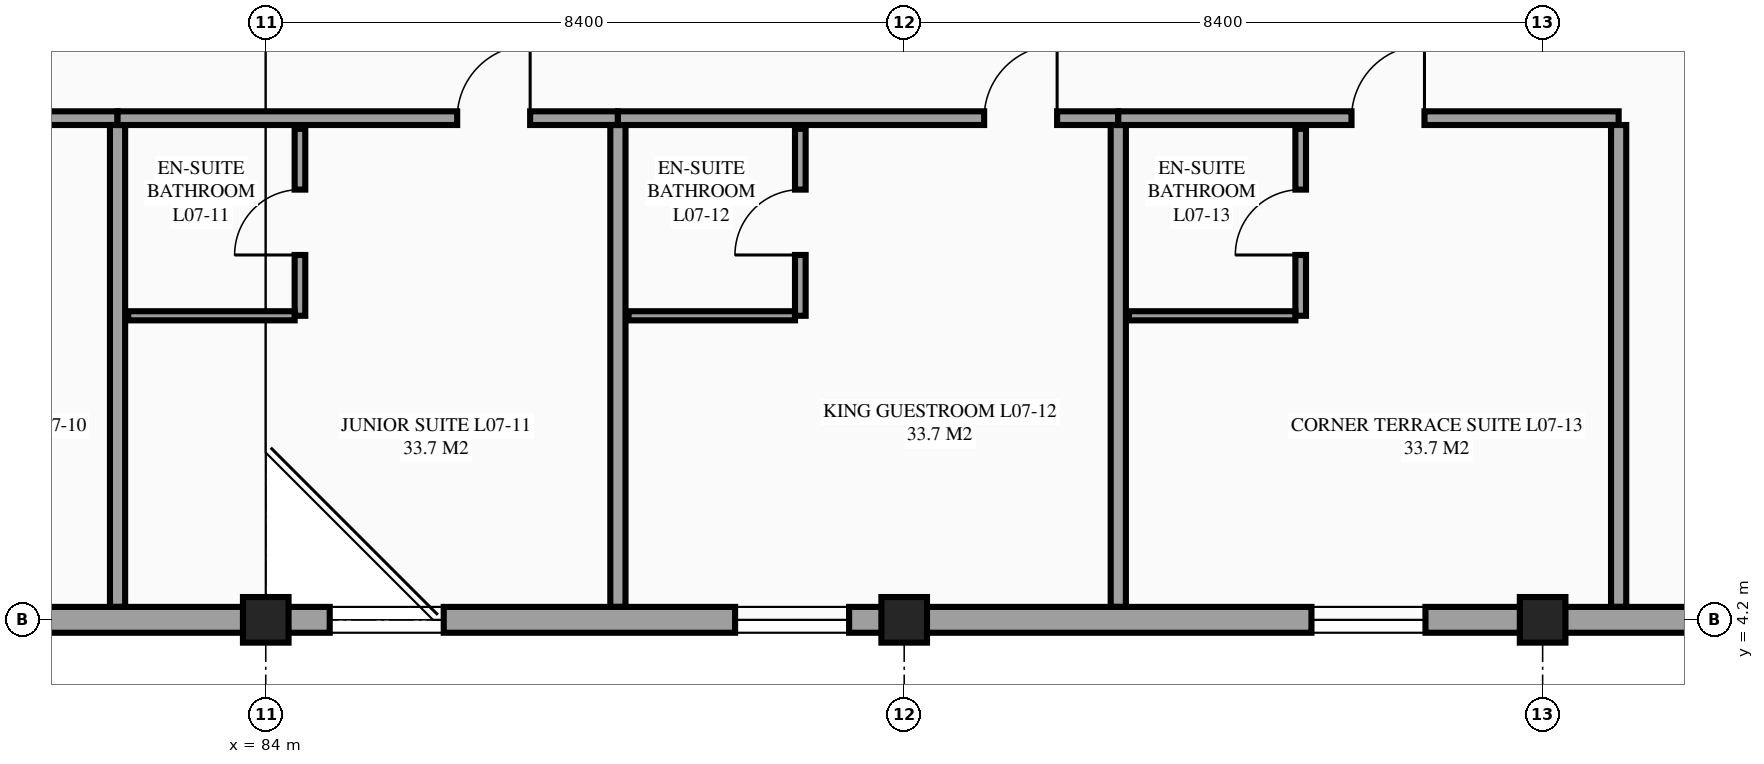
"""IFC4 building model, lengths in metres.
Left out: names, types, materials, properties, quantities, classifications, styles, units other than length and angle.
Written with IfcOpenShell. Run it as: python <this file> out.ifc"""

import sys

from ifc_helpers import new_model, si_unit, direction, frame, frame_2d, origin, origin_2d, place, context, subcontext, project, spatial, rectangle, extrude, element, fill, save


model = new_model("IFC4")
c1 = context("Model", 3, precision=1e-05, world=origin(), true_north=direction((0.0, 1.0)))
c2 = subcontext(c1, "Body", "Model", "MODEL_VIEW")
j1 = project(units=[si_unit("LENGTHUNIT", "METRE"), si_unit("PLANEANGLEUNIT", "RADIAN")], contexts=[c1])
p1 = place(None, origin())
s1 = spatial("IfcSite", under=j1, at=p1, CompositionType="ELEMENT")
p2 = place(p1, origin())
s2 = spatial("IfcBuilding", under=s1, at=p2, CompositionType="ELEMENT")
p3 = place(p2, frame((0.0, 0.0, 29.1)))
s3 = spatial("IfcBuildingStorey", under=s2, at=p3, CompositionType="ELEMENT", Elevation=29.1)
for number, where, z_axis, x_axis in (
    (1, (84.0, 4.2, 0.0), (0.0, 0.0, 1.0), (1.0, 0.0, 0.0)),
    (2, (92.4, 4.2, 0.0), (0.0, 0.0, 1.0), (1.0, 0.0, 0.0)),
    (3, (100.8, 4.2, 0.0), (0.0, 0.0, 1.0), (1.0, 0.0, 0.0)),
):
    element("IfcColumn", number, at=place(p3, frame(where, z_axis=z_axis, x_axis=x_axis)), inside=s3, PredefinedType="COLUMN", context=c2, shape_type="SweptSolid", body=[
        extrude(rectangle(XDim=0.6, YDim=0.6, at=origin_2d()), origin(), (0.0, 0.0, 1.0), 3.6),
    ])
p4 = place(p3, frame((75.467, 10.8, 0.0), z_axis=(0.0, 0.0, 1.0), x_axis=(1.0, 0.0, 0.0)))
e4 = element("IfcWall", 4, at=p4, inside=s3, PredefinedType="PARTITIONING", context=c2, shape_type="SweptSolid", body=[
    extrude(rectangle(XDim=6.583, YDim=0.18, at=frame_2d((3.292, 0.0))), origin(), (0.0, 0.0, 1.0), 3.375),
])
p5 = place(p4, frame((4.469, 0.0, 0.0)))
e5 = element("IfcOpeningElement", 5, at=p5, cuts=e4, PredefinedType="OPENING", context=c2, shape_type="SweptSolid", body=[
    extrude(rectangle(XDim=0.96, YDim=2.15, at=frame_2d((0.48, 1.075))), frame((0.0, 0.1, 0.0), z_axis=(0.0, -1.0, 0.0), x_axis=(1.0, 0.0, 0.0)), (0.0, 0.0, 1.0), 0.2),
])
p6 = place(p3, frame((82.05, 4.37, 0.0), z_axis=(0.0, 0.0, 1.0), x_axis=(0.0, 1.0, 0.0)))
e6 = element("IfcWall", 6, at=p6, inside=s3, PredefinedType="PARTITIONING", context=c2, shape_type="SweptSolid", body=[
    extrude(rectangle(XDim=6.34, YDim=0.2, at=frame_2d((3.17, 0.0))), origin(), (0.0, 0.0, 1.0), 3.375),
])
p7 = place(p3, frame((82.05, 10.8, 0.0), z_axis=(0.0, 0.0, 1.0), x_axis=(1.0, 0.0, 0.0)))
e7 = element("IfcWall", 7, at=p7, inside=s3, PredefinedType="PARTITIONING", context=c2, shape_type="SweptSolid", body=[
    extrude(rectangle(XDim=6.583, YDim=0.18, at=frame_2d((3.292, 0.0))), origin(), (0.0, 0.0, 1.0), 3.375),
])
p8 = place(p7, frame((4.469, 0.0, 0.0)))
e8 = element("IfcOpeningElement", 8, at=p8, cuts=e7, PredefinedType="OPENING", context=c2, shape_type="SweptSolid", body=[
    extrude(rectangle(XDim=0.96, YDim=2.15, at=frame_2d((0.48, 1.075))), frame((0.0, 0.1, 0.0), z_axis=(0.0, -1.0, 0.0), x_axis=(1.0, 0.0, 0.0)), (0.0, 0.0, 1.0), 0.2),
])
p9 = place(p3, frame((88.633, 4.37, 0.0), z_axis=(0.0, 0.0, 1.0), x_axis=(0.0, 1.0, 0.0)))
e9 = element("IfcWall", 9, at=p9, inside=s3, PredefinedType="PARTITIONING", context=c2, shape_type="SweptSolid", body=[
    extrude(rectangle(XDim=6.34, YDim=0.2, at=frame_2d((3.17, 0.0))), origin(), (0.0, 0.0, 1.0), 3.375),
])
p10 = place(p3, frame((84.45, 8.2, 0.0), z_axis=(0.0, 0.0, 1.0), x_axis=(0.0, 1.0, 0.0)))
e10 = element("IfcWall", 10, at=p10, inside=s3, PredefinedType="PARTITIONING", context=c2, shape_type="SweptSolid", body=[
    extrude(rectangle(XDim=2.46, YDim=0.14, at=frame_2d((1.23, 0.0))), origin(), (0.0, 0.0, 1.0), 3.375),
])
p11 = place(p10, frame((0.8, 0.0, 0.0)))
e11 = element("IfcOpeningElement", 11, at=p11, cuts=e10, PredefinedType="OPENING", context=c2, shape_type="SweptSolid", body=[
    extrude(rectangle(XDim=0.86, YDim=2.1, at=frame_2d((0.43, 1.05))), frame((0.0, 0.08, 0.0), z_axis=(0.0, -1.0, 0.0), x_axis=(1.0, 0.0, 0.0)), (0.0, 0.0, 1.0), 0.16),
])
p12 = place(p3, frame((82.19, 8.2, 0.0), z_axis=(0.0, 0.0, 1.0), x_axis=(1.0, 0.0, 0.0)))
e12 = element("IfcWall", 12, at=p12, inside=s3, PredefinedType="PARTITIONING", context=c2, shape_type="SweptSolid", body=[
    extrude(rectangle(XDim=2.19, YDim=0.12, at=frame_2d((1.095, 0.0))), origin(), (0.0, 0.0, 1.0), 3.375),
])
p13 = place(p3, frame((88.633, 10.8, 0.0), z_axis=(0.0, 0.0, 1.0), x_axis=(1.0, 0.0, 0.0)))
e13 = element("IfcWall", 13, at=p13, inside=s3, PredefinedType="PARTITIONING", context=c2, shape_type="SweptSolid", body=[
    extrude(rectangle(XDim=6.583, YDim=0.18, at=frame_2d((3.292, 0.0))), origin(), (0.0, 0.0, 1.0), 3.375),
])
p14 = place(p13, frame((4.819, 0.0, 0.0)))
e14 = element("IfcOpeningElement", 14, at=p14, cuts=e13, PredefinedType="OPENING", context=c2, shape_type="SweptSolid", body=[
    extrude(rectangle(XDim=0.96, YDim=2.15, at=frame_2d((0.48, 1.075))), frame((0.0, 0.1, 0.0), z_axis=(0.0, -1.0, 0.0), x_axis=(1.0, 0.0, 0.0)), (0.0, 0.0, 1.0), 0.2),
])
p15 = place(p3, frame((95.217, 4.37, 0.0), z_axis=(0.0, 0.0, 1.0), x_axis=(0.0, 1.0, 0.0)))
e15 = element("IfcWall", 15, at=p15, inside=s3, PredefinedType="PARTITIONING", context=c2, shape_type="SweptSolid", body=[
    extrude(rectangle(XDim=6.34, YDim=0.2, at=frame_2d((3.17, 0.0))), origin(), (0.0, 0.0, 1.0), 3.375),
])
p16 = place(p3, frame((91.033, 8.2, 0.0), z_axis=(0.0, 0.0, 1.0), x_axis=(0.0, 1.0, 0.0)))
e16 = element("IfcWall", 16, at=p16, inside=s3, PredefinedType="PARTITIONING", context=c2, shape_type="SweptSolid", body=[
    extrude(rectangle(XDim=2.46, YDim=0.14, at=frame_2d((1.23, 0.0))), origin(), (0.0, 0.0, 1.0), 3.375),
])
p17 = place(p16, frame((0.8, 0.0, 0.0)))
e17 = element("IfcOpeningElement", 17, at=p17, cuts=e16, PredefinedType="OPENING", context=c2, shape_type="SweptSolid", body=[
    extrude(rectangle(XDim=0.86, YDim=2.1, at=frame_2d((0.43, 1.05))), frame((0.0, 0.08, 0.0), z_axis=(0.0, -1.0, 0.0), x_axis=(1.0, 0.0, 0.0)), (0.0, 0.0, 1.0), 0.16),
])
p18 = place(p3, frame((88.773, 8.2, 0.0), z_axis=(0.0, 0.0, 1.0), x_axis=(1.0, 0.0, 0.0)))
e18 = element("IfcWall", 18, at=p18, inside=s3, PredefinedType="PARTITIONING", context=c2, shape_type="SweptSolid", body=[
    extrude(rectangle(XDim=2.19, YDim=0.12, at=frame_2d((1.095, 0.0))), origin(), (0.0, 0.0, 1.0), 3.375),
])
p19 = place(p3, frame((95.217, 10.8, 0.0), z_axis=(0.0, 0.0, 1.0), x_axis=(1.0, 0.0, 0.0)))
e19 = element("IfcWall", 19, at=p19, inside=s3, PredefinedType="PARTITIONING", context=c2, shape_type="SweptSolid", body=[
    extrude(rectangle(XDim=6.583, YDim=0.18, at=frame_2d((3.292, 0.0))), origin(), (0.0, 0.0, 1.0), 3.375),
])
p20 = place(p19, frame((3.069, 0.0, 0.0)))
e20 = element("IfcOpeningElement", 20, at=p20, cuts=e19, PredefinedType="OPENING", context=c2, shape_type="SweptSolid", body=[
    extrude(rectangle(XDim=0.96, YDim=2.15, at=frame_2d((0.48, 1.075))), frame((0.0, 0.1, 0.0), z_axis=(0.0, -1.0, 0.0), x_axis=(1.0, 0.0, 0.0)), (0.0, 0.0, 1.0), 0.2),
])
p21 = place(p3, frame((101.8, 4.37, 0.0), z_axis=(0.0, 0.0, 1.0), x_axis=(0.0, 1.0, 0.0)))
e21 = element("IfcWall", 21, at=p21, inside=s3, PredefinedType="PARTITIONING", context=c2, shape_type="SweptSolid", body=[
    extrude(rectangle(XDim=6.34, YDim=0.2, at=frame_2d((3.17, 0.0))), origin(), (0.0, 0.0, 1.0), 3.375),
])
p22 = place(p3, frame((97.617, 8.2, 0.0), z_axis=(0.0, 0.0, 1.0), x_axis=(0.0, 1.0, 0.0)))
e22 = element("IfcWall", 22, at=p22, inside=s3, PredefinedType="PARTITIONING", context=c2, shape_type="SweptSolid", body=[
    extrude(rectangle(XDim=2.46, YDim=0.14, at=frame_2d((1.23, 0.0))), origin(), (0.0, 0.0, 1.0), 3.375),
])
p23 = place(p22, frame((0.8, 0.0, 0.0)))
e23 = element("IfcOpeningElement", 23, at=p23, cuts=e22, PredefinedType="OPENING", context=c2, shape_type="SweptSolid", body=[
    extrude(rectangle(XDim=0.86, YDim=2.1, at=frame_2d((0.43, 1.05))), frame((0.0, 0.08, 0.0), z_axis=(0.0, -1.0, 0.0), x_axis=(1.0, 0.0, 0.0)), (0.0, 0.0, 1.0), 0.16),
])
p24 = place(p3, frame((95.357, 8.2, 0.0), z_axis=(0.0, 0.0, 1.0), x_axis=(1.0, 0.0, 0.0)))
e24 = element("IfcWall", 24, at=p24, inside=s3, PredefinedType="PARTITIONING", context=c2, shape_type="SweptSolid", body=[
    extrude(rectangle(XDim=2.19, YDim=0.12, at=frame_2d((1.095, 0.0))), origin(), (0.0, 0.0, 1.0), 3.375),
])
p25 = place(p3, frame((75.6, 4.2, 0.0), z_axis=(0.0, 0.0, 1.0), x_axis=(1.0, 0.0, 0.0)))
e25 = element("IfcWall", 25, at=p25, inside=s3, PredefinedType="STANDARD", context=c2, shape_type="SweptSolid", body=[
    extrude(rectangle(XDim=8.4, YDim=0.34, at=frame_2d((4.2, 0.0))), origin(), (0.0, 0.0, 1.0), 2.78),
])
p26 = place(p25, frame((2.408, 0.0, 0.85)))
e26 = element("IfcOpeningElement", 26, at=p26, cuts=e25, PredefinedType="OPENING", context=c2, shape_type="SweptSolid", body=[
    extrude(rectangle(XDim=1.5, YDim=1.5, at=frame_2d((0.75, 0.75))), frame((0.0, 0.18, 0.0), z_axis=(0.0, -1.0, 0.0), x_axis=(1.0, 0.0, 0.0)), (0.0, 0.0, 1.0), 0.36),
])
p27 = place(p3, frame((84.0, 4.2, 0.0), z_axis=(0.0, 0.0, 1.0), x_axis=(1.0, 0.0, 0.0)))
e27 = element("IfcWall", 27, at=p27, inside=s3, PredefinedType="STANDARD", context=c2, shape_type="SweptSolid", body=[
    extrude(rectangle(XDim=8.4, YDim=0.34, at=frame_2d((4.2, 0.0))), origin(), (0.0, 0.0, 1.0), 2.43),
])
p28 = place(p27, frame((0.842, 0.0, 0.85)))
e28 = element("IfcOpeningElement", 28, at=p28, cuts=e27, PredefinedType="OPENING", context=c2, shape_type="SweptSolid", body=[
    extrude(rectangle(XDim=1.5, YDim=1.5, at=frame_2d((0.75, 0.75))), frame((0.0, 0.18, 0.0), z_axis=(0.0, -1.0, 0.0), x_axis=(1.0, 0.0, 0.0)), (0.0, 0.0, 1.0), 0.36),
])
p29 = place(p27, frame((6.175, 0.0, 0.85)))
e29 = element("IfcOpeningElement", 29, at=p29, cuts=e27, PredefinedType="OPENING", context=c2, shape_type="SweptSolid", body=[
    extrude(rectangle(XDim=1.5, YDim=1.5, at=frame_2d((0.75, 0.75))), frame((0.0, 0.18, 0.0), z_axis=(0.0, -1.0, 0.0), x_axis=(1.0, 0.0, 0.0)), (0.0, 0.0, 1.0), 0.36),
])
p30 = place(p3, frame((92.4, 4.2, 0.0), z_axis=(0.0, 0.0, 1.0), x_axis=(1.0, 0.0, 0.0)))
e30 = element("IfcWall", 30, at=p30, inside=s3, PredefinedType="STANDARD", context=c2, shape_type="SweptSolid", body=[
    extrude(rectangle(XDim=8.4, YDim=0.34, at=frame_2d((4.2, 0.0))), origin(), (0.0, 0.0, 1.0), 3.07),
])
p31 = place(p30, frame((5.358, 0.0, 0.85)))
e31 = element("IfcOpeningElement", 31, at=p31, cuts=e30, PredefinedType="OPENING", context=c2, shape_type="SweptSolid", body=[
    extrude(rectangle(XDim=1.5, YDim=1.5, at=frame_2d((0.75, 0.75))), frame((0.0, 0.18, 0.0), z_axis=(0.0, -1.0, 0.0), x_axis=(1.0, 0.0, 0.0)), (0.0, 0.0, 1.0), 0.36),
])
p32 = place(p3, frame((100.8, 4.2, 0.0), z_axis=(0.0, 0.0, 1.0), x_axis=(1.0, 0.0, 0.0)))
e32 = element("IfcWall", 32, at=p32, inside=s3, PredefinedType="STANDARD", context=c2, shape_type="SweptSolid", body=[
    extrude(rectangle(XDim=16.8, YDim=0.34, at=frame_2d((8.4, 0.0))), origin(), (0.0, 0.0, 1.0), 2.48),
])
p33 = place(p32, frame((10.84, 0.0, 0.85)))
e33 = element("IfcOpeningElement", 33, at=p33, cuts=e32, PredefinedType="OPENING", context=c2, shape_type="SweptSolid", body=[
    extrude(rectangle(XDim=1.2, YDim=1.5, at=frame_2d((0.6, 0.75))), frame((0.0, 0.18, 0.0), z_axis=(0.0, -1.0, 0.0), x_axis=(1.0, 0.0, 0.0)), (0.0, 0.0, 1.0), 0.36),
])
p34 = place(p28, origin())
e34 = element("IfcWindow", 34, at=p34, inside=s3, PartitioningType="SINGLE_PANEL", PredefinedType="WINDOW", context=c2, shape_type="SweptSolid", body=[
    extrude(rectangle(XDim=1.5, YDim=1.5, at=frame_2d((0.75, 0.75))), frame((0.0, 0.03, 0.0), z_axis=(0.0, -1.0, 0.0), x_axis=(1.0, 0.0, 0.0)), (0.0, 0.0, 1.0), 0.06),
])
fill(e28, e34)
p35 = place(p29, origin())
e35 = element("IfcWindow", 35, at=p35, inside=s3, PartitioningType="SINGLE_PANEL", PredefinedType="WINDOW", context=c2, shape_type="SweptSolid", body=[
    extrude(rectangle(XDim=1.5, YDim=1.5, at=frame_2d((0.75, 0.75))), frame((0.0, 0.03, 0.0), z_axis=(0.0, -1.0, 0.0), x_axis=(1.0, 0.0, 0.0)), (0.0, 0.0, 1.0), 0.06),
])
fill(e29, e35)
p36 = place(p31, origin())
e36 = element("IfcWindow", 36, at=p36, inside=s3, PartitioningType="SINGLE_PANEL", PredefinedType="WINDOW", context=c2, shape_type="SweptSolid", body=[
    extrude(rectangle(XDim=1.5, YDim=1.5, at=frame_2d((0.75, 0.75))), frame((0.0, 0.03, 0.0), z_axis=(0.0, -1.0, 0.0), x_axis=(1.0, 0.0, 0.0)), (0.0, 0.0, 1.0), 0.06),
])
fill(e31, e36)
p37 = place(p8, origin())
e37 = element("IfcDoor", 37, at=p37, inside=s3, OperationType="SINGLE_SWING_RIGHT", PredefinedType="DOOR", context=c2, shape_type="SweptSolid", body=[
    extrude(rectangle(XDim=0.96, YDim=2.15, at=frame_2d((0.48, 1.075))), frame((0.0, 0.025, 0.0), z_axis=(0.0, -1.0, 0.0), x_axis=(1.0, 0.0, 0.0)), (0.0, 0.0, 1.0), 0.05),
])
fill(e8, e37)
p38 = place(p11, origin())
e38 = element("IfcDoor", 38, at=p38, inside=s3, OperationType="SINGLE_SWING_LEFT", PredefinedType="DOOR", context=c2, shape_type="SweptSolid", body=[
    extrude(rectangle(XDim=0.86, YDim=2.1, at=frame_2d((0.43, 1.05))), frame((0.0, 0.025, 0.0), z_axis=(0.0, -1.0, 0.0), x_axis=(1.0, 0.0, 0.0)), (0.0, 0.0, 1.0), 0.05),
])
fill(e11, e38)
p39 = place(p14, origin())
e39 = element("IfcDoor", 39, at=p39, inside=s3, OperationType="SINGLE_SWING_RIGHT", PredefinedType="DOOR", context=c2, shape_type="SweptSolid", body=[
    extrude(rectangle(XDim=0.96, YDim=2.15, at=frame_2d((0.48, 1.075))), frame((0.0, 0.025, 0.0), z_axis=(0.0, -1.0, 0.0), x_axis=(1.0, 0.0, 0.0)), (0.0, 0.0, 1.0), 0.05),
])
fill(e14, e39)
p40 = place(p17, origin())
e40 = element("IfcDoor", 40, at=p40, inside=s3, OperationType="SINGLE_SWING_LEFT", PredefinedType="DOOR", context=c2, shape_type="SweptSolid", body=[
    extrude(rectangle(XDim=0.86, YDim=2.1, at=frame_2d((0.43, 1.05))), frame((0.0, 0.025, 0.0), z_axis=(0.0, -1.0, 0.0), x_axis=(1.0, 0.0, 0.0)), (0.0, 0.0, 1.0), 0.05),
])
fill(e17, e40)
p41 = place(p20, origin())
e41 = element("IfcDoor", 41, at=p41, inside=s3, OperationType="SINGLE_SWING_RIGHT", PredefinedType="DOOR", context=c2, shape_type="SweptSolid", body=[
    extrude(rectangle(XDim=0.96, YDim=2.15, at=frame_2d((0.48, 1.075))), frame((0.0, 0.025, 0.0), z_axis=(0.0, -1.0, 0.0), x_axis=(1.0, 0.0, 0.0)), (0.0, 0.0, 1.0), 0.05),
])
fill(e20, e41)
p42 = place(p23, origin())
e42 = element("IfcDoor", 42, at=p42, inside=s3, OperationType="SINGLE_SWING_LEFT", PredefinedType="DOOR", context=c2, shape_type="SweptSolid", body=[
    extrude(rectangle(XDim=0.86, YDim=2.1, at=frame_2d((0.43, 1.05))), frame((0.0, 0.025, 0.0), z_axis=(0.0, -1.0, 0.0), x_axis=(1.0, 0.0, 0.0)), (0.0, 0.0, 1.0), 0.05),
])
fill(e23, e42)
save(model, sys.argv[1])
